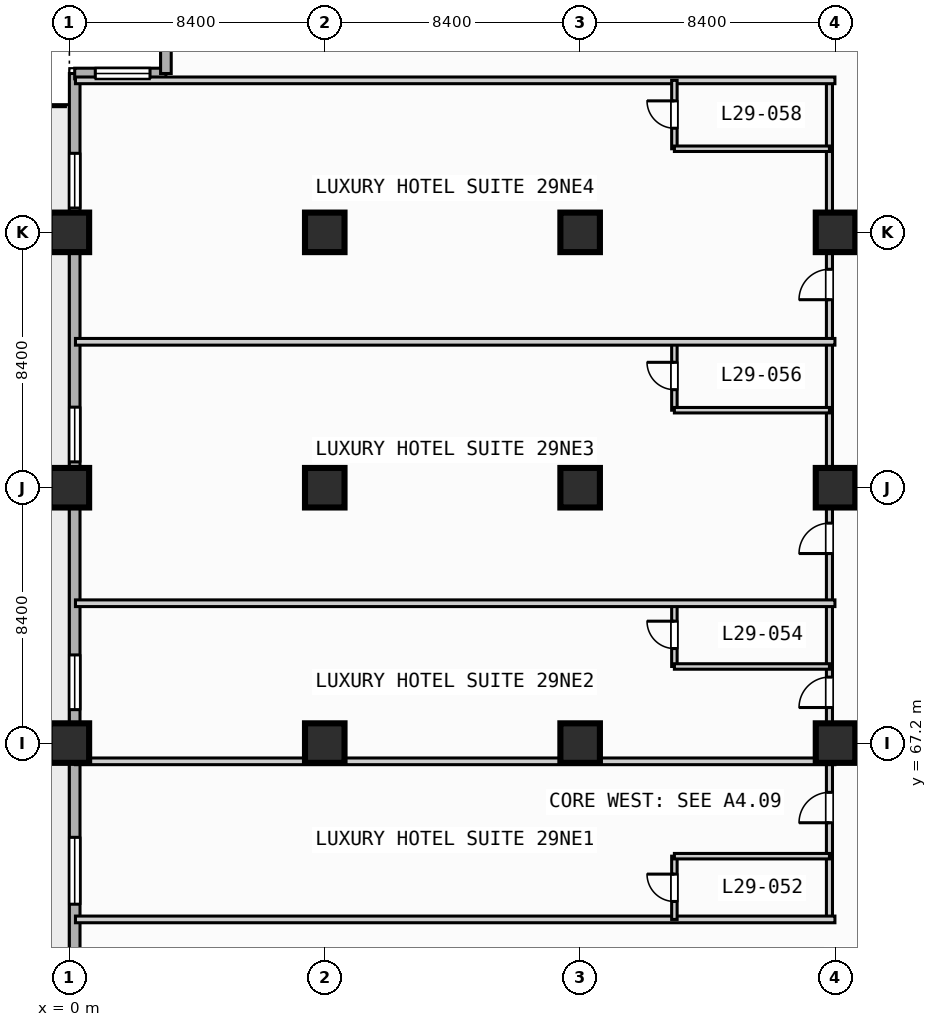
"""IFC4 building model, lengths in metres.
Left out: names, types, materials, properties, quantities, classifications, styles, units other than length and angle.
Written with IfcOpenShell. Run it as: python <this file> out.ifc"""

import sys

from ifc_helpers import new_model, si_unit, direction, frame, frame_2d, origin, origin_2d, place, context, subcontext, project, spatial, rectangle, extrude, element, fill, save


model = new_model("IFC4")
c1 = context("Model", 3, precision=1e-05, world=origin(), true_north=direction((0.0, 1.0)))
c2 = subcontext(c1, "Body", "Model", "MODEL_VIEW")
j1 = project(units=[si_unit("LENGTHUNIT", "METRE"), si_unit("PLANEANGLEUNIT", "RADIAN")], contexts=[c1])
p1 = place(None, origin())
s1 = spatial("IfcSite", under=j1, at=p1, CompositionType="ELEMENT")
p2 = place(p1, origin())
s2 = spatial("IfcBuilding", under=s1, at=p2, CompositionType="ELEMENT")
p3 = place(p2, frame((0.0, 0.0, 122.8)))
s3 = spatial("IfcBuildingStorey", under=s2, at=p3, CompositionType="ELEMENT", Elevation=122.8)
for number, where, z_axis, x_axis in (
    (1, (0.0, 67.2, 0.0), (0.0, 0.0, 1.0), (1.0, 0.0, 0.0)),
    (2, (0.0, 75.6, 0.0), (0.0, 0.0, 1.0), (1.0, 0.0, 0.0)),
    (3, (0.0, 84.0, 0.0), (0.0, 0.0, 1.0), (1.0, 0.0, 0.0)),
    (4, (8.4, 67.2, 0.0), (0.0, 0.0, 1.0), (1.0, 0.0, 0.0)),
    (5, (8.4, 75.6, 0.0), (0.0, 0.0, 1.0), (1.0, 0.0, 0.0)),
    (6, (8.4, 84.0, 0.0), (0.0, 0.0, 1.0), (1.0, 0.0, 0.0)),
    (7, (16.8, 67.2, 0.0), (0.0, 0.0, 1.0), (1.0, 0.0, 0.0)),
    (8, (16.8, 75.6, 0.0), (0.0, 0.0, 1.0), (1.0, 0.0, 0.0)),
    (9, (16.8, 84.0, 0.0), (0.0, 0.0, 1.0), (1.0, 0.0, 0.0)),
    (10, (25.2, 67.2, 0.0), (0.0, 0.0, 1.0), (1.0, 0.0, 0.0)),
    (11, (25.2, 75.6, 0.0), (0.0, 0.0, 1.0), (1.0, 0.0, 0.0)),
    (12, (25.2, 84.0, 0.0), (0.0, 0.0, 1.0), (1.0, 0.0, 0.0)),
):
    element("IfcColumn", number, at=place(p3, frame(where, z_axis=z_axis, x_axis=x_axis)), inside=s3, PredefinedType="COLUMN", context=c2, shape_type="SweptSolid", body=[
        extrude(rectangle(XDim=1.3, YDim=1.3, at=origin_2d()), origin(), (0.0, 0.0, 1.0), 3.8),
    ])
p4 = place(p3, frame((0.175, 3.175, 0.0), z_axis=(0.0, 0.0, 1.0), x_axis=(0.0, 1.0, 0.0)))
e13 = element("IfcWall", 13, at=p4, inside=s3, PredefinedType="STANDARD", context=c2, shape_type="SweptSolid", body=[
    extrude(rectangle(XDim=86.05, YDim=0.35, at=frame_2d((43.025, 0.0))), origin(), (0.0, 0.0, 1.0), 3.55),
])
p5 = place(p4, frame((42.325, 0.0, 0.0)))
e14 = element("IfcOpeningElement", 14, at=p5, cuts=e13, PredefinedType="OPENING", context=c2, shape_type="SweptSolid", body=[
    extrude(rectangle(XDim=1.4, YDim=2.2, at=frame_2d((0.7, 1.1))), frame((0.0, 0.185, 0.0), z_axis=(0.0, -1.0, 0.0), x_axis=(1.0, 0.0, 0.0)), (0.0, 0.0, 1.0), 0.37),
])
p6 = place(p4, frame((33.525, 0.0, 0.85)))
e15 = element("IfcOpeningElement", 15, at=p6, cuts=e13, PredefinedType="OPENING", context=c2, shape_type="SweptSolid", body=[
    extrude(rectangle(XDim=2.2, YDim=1.8, at=frame_2d((1.1, 0.9))), frame((0.0, 0.185, 0.0), z_axis=(0.0, -1.0, 0.0), x_axis=(1.0, 0.0, 0.0)), (0.0, 0.0, 1.0), 0.37),
])
p7 = place(p4, frame((58.725, 0.0, 0.85)))
e16 = element("IfcOpeningElement", 16, at=p7, cuts=e13, PredefinedType="OPENING", context=c2, shape_type="SweptSolid", body=[
    extrude(rectangle(XDim=2.2, YDim=1.8, at=frame_2d((1.1, 0.9))), frame((0.0, 0.185, 0.0), z_axis=(0.0, -1.0, 0.0), x_axis=(1.0, 0.0, 0.0)), (0.0, 0.0, 1.0), 0.37),
])
p8 = place(p4, frame((65.125, 0.0, 0.85)))
e17 = element("IfcOpeningElement", 17, at=p8, cuts=e13, PredefinedType="OPENING", context=c2, shape_type="SweptSolid", body=[
    extrude(rectangle(XDim=1.8, YDim=1.8, at=frame_2d((0.9, 0.9))), frame((0.0, 0.185, 0.0), z_axis=(0.0, -1.0, 0.0), x_axis=(1.0, 0.0, 0.0)), (0.0, 0.0, 1.0), 0.37),
])
p9 = place(p4, frame((73.275, 0.0, 0.85)))
e18 = element("IfcOpeningElement", 18, at=p9, cuts=e13, PredefinedType="OPENING", context=c2, shape_type="SweptSolid", body=[
    extrude(rectangle(XDim=1.8, YDim=1.8, at=frame_2d((0.9, 0.9))), frame((0.0, 0.185, 0.0), z_axis=(0.0, -1.0, 0.0), x_axis=(1.0, 0.0, 0.0)), (0.0, 0.0, 1.0), 0.37),
])
p10 = place(p4, frame((81.625, 0.0, 0.85)))
e19 = element("IfcOpeningElement", 19, at=p10, cuts=e13, PredefinedType="OPENING", context=c2, shape_type="SweptSolid", body=[
    extrude(rectangle(XDim=1.8, YDim=1.8, at=frame_2d((0.9, 0.9))), frame((0.0, 0.185, 0.0), z_axis=(0.0, -1.0, 0.0), x_axis=(1.0, 0.0, 0.0)), (0.0, 0.0, 1.0), 0.37),
])
p11 = place(p3, frame((0.175, 89.225, 0.0), z_axis=(0.0, 0.0, 1.0), x_axis=(1.0, 0.0, 0.0)))
e20 = element("IfcWall", 20, at=p11, inside=s3, PredefinedType="STANDARD", context=c2, shape_type="SweptSolid", body=[
    extrude(rectangle(XDim=3.0, YDim=0.35, at=frame_2d((1.5, 0.0))), origin(), (0.0, 0.0, 1.0), 3.55),
])
p12 = place(p11, frame((0.677, 0.0, 0.85)))
e21 = element("IfcOpeningElement", 21, at=p12, cuts=e20, PredefinedType="OPENING", context=c2, shape_type="SweptSolid", body=[
    extrude(rectangle(XDim=1.8, YDim=1.8, at=frame_2d((0.9, 0.9))), frame((0.0, 0.185, 0.0), z_axis=(0.0, -1.0, 0.0), x_axis=(1.0, 0.0, 0.0)), (0.0, 0.0, 1.0), 0.37),
])
p13 = place(p3, frame((3.175, 89.225, 0.0), z_axis=(0.0, 0.0, 1.0), x_axis=(0.0, 1.0, 0.0)))
e22 = element("IfcWall", 22, at=p13, inside=s3, PredefinedType="STANDARD", context=c2, shape_type="SweptSolid", body=[
    extrude(rectangle(XDim=3.0, YDim=0.35, at=frame_2d((1.5, 0.0))), origin(), (0.0, 0.0, 1.0), 3.55),
])
p14 = place(p3, frame((25.0, 61.4, 0.0), z_axis=(0.0, 0.0, 1.0), x_axis=(0.0, 1.0, 0.0)))
e23 = element("IfcWall", 23, at=p14, inside=s3, PredefinedType="PARTITIONING", context=c2, shape_type="SweptSolid", body=[
    extrude(rectangle(XDim=27.6, YDim=0.2, at=frame_2d((13.8, 0.0))), origin(), (0.0, 0.0, 1.0), 2.8),
])
p15 = place(p14, frame((3.18, 0.0, 0.0)))
e24 = element("IfcOpeningElement", 24, at=p15, cuts=e23, PredefinedType="OPENING", context=c2, shape_type="SweptSolid", body=[
    extrude(rectangle(XDim=1.0, YDim=2.15, at=frame_2d((0.5, 1.075))), frame((0.0, 0.11, 0.0), z_axis=(0.0, -1.0, 0.0), x_axis=(1.0, 0.0, 0.0)), (0.0, 0.0, 1.0), 0.22),
])
p16 = place(p14, frame((6.97, 0.0, 0.0)))
e25 = element("IfcOpeningElement", 25, at=p16, cuts=e23, PredefinedType="OPENING", context=c2, shape_type="SweptSolid", body=[
    extrude(rectangle(XDim=1.0, YDim=2.15, at=frame_2d((0.5, 1.075))), frame((0.0, 0.11, 0.0), z_axis=(0.0, -1.0, 0.0), x_axis=(1.0, 0.0, 0.0)), (0.0, 0.0, 1.0), 0.22),
])
p17 = place(p14, frame((12.035, 0.0, 0.0)))
e26 = element("IfcOpeningElement", 26, at=p17, cuts=e23, PredefinedType="OPENING", context=c2, shape_type="SweptSolid", body=[
    extrude(rectangle(XDim=1.0, YDim=2.15, at=frame_2d((0.5, 1.075))), frame((0.0, 0.11, 0.0), z_axis=(0.0, -1.0, 0.0), x_axis=(1.0, 0.0, 0.0)), (0.0, 0.0, 1.0), 0.22),
])
p18 = place(p14, frame((20.385, 0.0, 0.0)))
e27 = element("IfcOpeningElement", 27, at=p18, cuts=e23, PredefinedType="OPENING", context=c2, shape_type="SweptSolid", body=[
    extrude(rectangle(XDim=1.0, YDim=2.15, at=frame_2d((0.5, 1.075))), frame((0.0, 0.11, 0.0), z_axis=(0.0, -1.0, 0.0), x_axis=(1.0, 0.0, 0.0)), (0.0, 0.0, 1.0), 0.22),
])
p19 = place(p3, frame((0.2, 61.4, 0.0), z_axis=(0.0, 0.0, 1.0), x_axis=(1.0, 0.0, 0.0)))
e28 = element("IfcWall", 28, at=p19, inside=s3, PredefinedType="PARTITIONING", context=c2, shape_type="SweptSolid", body=[
    extrude(rectangle(XDim=24.98, YDim=0.22, at=frame_2d((12.49, 0.0))), origin(), (0.0, 0.0, 1.0), 3.55),
])
p20 = place(p3, frame((19.9, 61.4, 0.0), z_axis=(0.0, 0.0, 1.0), x_axis=(0.0, 1.0, 0.0)))
e29 = element("IfcWall", 29, at=p20, inside=s3, PredefinedType="PLUMBINGWALL", context=c2, shape_type="SweptSolid", body=[
    extrude(rectangle(XDim=2.08, YDim=0.18, at=frame_2d((1.04, 0.0))), origin(), (0.0, 0.0, 1.0), 3.55),
])
p21 = place(p20, frame((0.59, 0.0, 0.0)))
e30 = element("IfcOpeningElement", 30, at=p21, cuts=e29, PredefinedType="OPENING", context=c2, shape_type="SweptSolid", body=[
    extrude(rectangle(XDim=0.9, YDim=2.1, at=frame_2d((0.45, 1.05))), frame((0.0, 0.1, 0.0), z_axis=(0.0, -1.0, 0.0), x_axis=(1.0, 0.0, 0.0)), (0.0, 0.0, 1.0), 0.2),
])
p22 = place(p3, frame((19.9, 63.48, 0.0), z_axis=(0.0, 0.0, 1.0), x_axis=(1.0, 0.0, 0.0)))
e31 = element("IfcWall", 31, at=p22, inside=s3, PredefinedType="PLUMBINGWALL", context=c2, shape_type="SweptSolid", body=[
    extrude(rectangle(XDim=5.1, YDim=0.18, at=frame_2d((2.55, 0.0))), origin(), (0.0, 0.0, 1.0), 3.55),
])
p23 = place(p3, frame((0.2, 66.6, 0.0), z_axis=(0.0, 0.0, 1.0), x_axis=(1.0, 0.0, 0.0)))
e32 = element("IfcWall", 32, at=p23, inside=s3, PredefinedType="PARTITIONING", context=c2, shape_type="SweptSolid", body=[
    extrude(rectangle(XDim=24.98, YDim=0.22, at=frame_2d((12.49, 0.0))), origin(), (0.0, 0.0, 1.0), 3.55),
])
p24 = place(p3, frame((19.9, 69.72, 0.0), z_axis=(0.0, 0.0, 1.0), x_axis=(0.0, 1.0, 0.0)))
e33 = element("IfcWall", 33, at=p24, inside=s3, PredefinedType="PLUMBINGWALL", context=c2, shape_type="SweptSolid", body=[
    extrude(rectangle(XDim=2.08, YDim=0.18, at=frame_2d((1.04, 0.0))), origin(), (0.0, 0.0, 1.0), 3.55),
])
p25 = place(p24, frame((0.59, 0.0, 0.0)))
e34 = element("IfcOpeningElement", 34, at=p25, cuts=e33, PredefinedType="OPENING", context=c2, shape_type="SweptSolid", body=[
    extrude(rectangle(XDim=0.9, YDim=2.1, at=frame_2d((0.45, 1.05))), frame((0.0, 0.1, 0.0), z_axis=(0.0, -1.0, 0.0), x_axis=(1.0, 0.0, 0.0)), (0.0, 0.0, 1.0), 0.2),
])
p26 = place(p3, frame((19.9, 69.72, 0.0), z_axis=(0.0, 0.0, 1.0), x_axis=(1.0, 0.0, 0.0)))
e35 = element("IfcWall", 35, at=p26, inside=s3, PredefinedType="PLUMBINGWALL", context=c2, shape_type="SweptSolid", body=[
    extrude(rectangle(XDim=5.1, YDim=0.18, at=frame_2d((2.55, 0.0))), origin(), (0.0, 0.0, 1.0), 3.55),
])
p27 = place(p3, frame((0.2, 71.8, 0.0), z_axis=(0.0, 0.0, 1.0), x_axis=(1.0, 0.0, 0.0)))
e36 = element("IfcWall", 36, at=p27, inside=s3, PredefinedType="PARTITIONING", context=c2, shape_type="SweptSolid", body=[
    extrude(rectangle(XDim=24.98, YDim=0.22, at=frame_2d((12.49, 0.0))), origin(), (0.0, 0.0, 1.0), 3.55),
])
p28 = place(p3, frame((19.9, 78.15, 0.0), z_axis=(0.0, 0.0, 1.0), x_axis=(0.0, 1.0, 0.0)))
e37 = element("IfcWall", 37, at=p28, inside=s3, PredefinedType="PLUMBINGWALL", context=c2, shape_type="SweptSolid", body=[
    extrude(rectangle(XDim=2.25, YDim=0.18, at=frame_2d((1.125, 0.0))), origin(), (0.0, 0.0, 1.0), 3.55),
])
p29 = place(p28, frame((0.675, 0.0, 0.0)))
e38 = element("IfcOpeningElement", 38, at=p29, cuts=e37, PredefinedType="OPENING", context=c2, shape_type="SweptSolid", body=[
    extrude(rectangle(XDim=0.9, YDim=2.1, at=frame_2d((0.45, 1.05))), frame((0.0, 0.1, 0.0), z_axis=(0.0, -1.0, 0.0), x_axis=(1.0, 0.0, 0.0)), (0.0, 0.0, 1.0), 0.2),
])
p30 = place(p3, frame((19.9, 78.15, 0.0), z_axis=(0.0, 0.0, 1.0), x_axis=(1.0, 0.0, 0.0)))
e39 = element("IfcWall", 39, at=p30, inside=s3, PredefinedType="PLUMBINGWALL", context=c2, shape_type="SweptSolid", body=[
    extrude(rectangle(XDim=5.1, YDim=0.18, at=frame_2d((2.55, 0.0))), origin(), (0.0, 0.0, 1.0), 3.55),
])
for number, where, z_axis, x_axis in (
    (40, (0.2, 80.4, 0.0), (0.0, 0.0, 1.0), (1.0, 0.0, 0.0)),
    (41, (0.2, 89.0, 0.0), (0.0, 0.0, 1.0), (1.0, 0.0, 0.0)),
):
    element("IfcWall", number, at=place(p3, frame(where, z_axis=z_axis, x_axis=x_axis)), inside=s3, PredefinedType="PARTITIONING", context=c2, shape_type="SweptSolid", body=[
        extrude(rectangle(XDim=24.98, YDim=0.22, at=frame_2d((12.49, 0.0))), origin(), (0.0, 0.0, 1.0), 3.55),
    ])
p31 = place(p3, frame((19.9, 86.75, 0.0), z_axis=(0.0, 0.0, 1.0), x_axis=(0.0, 1.0, 0.0)))
e42 = element("IfcWall", 42, at=p31, inside=s3, PredefinedType="PLUMBINGWALL", context=c2, shape_type="SweptSolid", body=[
    extrude(rectangle(XDim=2.25, YDim=0.18, at=frame_2d((1.125, 0.0))), origin(), (0.0, 0.0, 1.0), 3.55),
])
p32 = place(p31, frame((0.675, 0.0, 0.0)))
e43 = element("IfcOpeningElement", 43, at=p32, cuts=e42, PredefinedType="OPENING", context=c2, shape_type="SweptSolid", body=[
    extrude(rectangle(XDim=0.9, YDim=2.1, at=frame_2d((0.45, 1.05))), frame((0.0, 0.1, 0.0), z_axis=(0.0, -1.0, 0.0), x_axis=(1.0, 0.0, 0.0)), (0.0, 0.0, 1.0), 0.2),
])
p33 = place(p3, frame((19.9, 86.75, 0.0), z_axis=(0.0, 0.0, 1.0), x_axis=(1.0, 0.0, 0.0)))
e44 = element("IfcWall", 44, at=p33, inside=s3, PredefinedType="PLUMBINGWALL", context=c2, shape_type="SweptSolid", body=[
    extrude(rectangle(XDim=5.1, YDim=0.18, at=frame_2d((2.55, 0.0))), origin(), (0.0, 0.0, 1.0), 3.55),
])
p34 = place(p7, origin())
e45 = element("IfcWindow", 45, at=p34, inside=s3, PartitioningType="SINGLE_PANEL", PredefinedType="WINDOW", context=c2, shape_type="SweptSolid", body=[
    extrude(rectangle(XDim=2.2, YDim=1.8, at=frame_2d((1.1, 0.9))), frame((0.0, 0.03, 0.0), z_axis=(0.0, -1.0, 0.0), x_axis=(1.0, 0.0, 0.0)), (0.0, 0.0, 1.0), 0.06),
])
fill(e16, e45)
p35 = place(p8, origin())
e46 = element("IfcWindow", 46, at=p35, inside=s3, PartitioningType="SINGLE_PANEL", PredefinedType="WINDOW", context=c2, shape_type="SweptSolid", body=[
    extrude(rectangle(XDim=1.8, YDim=1.8, at=frame_2d((0.9, 0.9))), frame((0.0, 0.03, 0.0), z_axis=(0.0, -1.0, 0.0), x_axis=(1.0, 0.0, 0.0)), (0.0, 0.0, 1.0), 0.06),
])
fill(e17, e46)
p36 = place(p9, origin())
e47 = element("IfcWindow", 47, at=p36, inside=s3, PartitioningType="SINGLE_PANEL", PredefinedType="WINDOW", context=c2, shape_type="SweptSolid", body=[
    extrude(rectangle(XDim=1.8, YDim=1.8, at=frame_2d((0.9, 0.9))), frame((0.0, 0.03, 0.0), z_axis=(0.0, -1.0, 0.0), x_axis=(1.0, 0.0, 0.0)), (0.0, 0.0, 1.0), 0.06),
])
fill(e18, e47)
p37 = place(p10, origin())
e48 = element("IfcWindow", 48, at=p37, inside=s3, PartitioningType="SINGLE_PANEL", PredefinedType="WINDOW", context=c2, shape_type="SweptSolid", body=[
    extrude(rectangle(XDim=1.8, YDim=1.8, at=frame_2d((0.9, 0.9))), frame((0.0, 0.03, 0.0), z_axis=(0.0, -1.0, 0.0), x_axis=(1.0, 0.0, 0.0)), (0.0, 0.0, 1.0), 0.06),
])
fill(e19, e48)
p38 = place(p12, origin())
e49 = element("IfcWindow", 49, at=p38, inside=s3, PartitioningType="SINGLE_PANEL", PredefinedType="WINDOW", context=c2, shape_type="SweptSolid", body=[
    extrude(rectangle(XDim=1.8, YDim=1.8, at=frame_2d((0.9, 0.9))), frame((0.0, 0.03, 0.0), z_axis=(0.0, -1.0, 0.0), x_axis=(1.0, 0.0, 0.0)), (0.0, 0.0, 1.0), 0.06),
])
fill(e21, e49)
p39 = place(p15, origin())
e50 = element("IfcDoor", 50, at=p39, inside=s3, OperationType="SINGLE_SWING_LEFT", PredefinedType="DOOR", context=c2, shape_type="SweptSolid", body=[
    extrude(rectangle(XDim=1.0, YDim=2.15, at=frame_2d((0.5, 1.075))), frame((0.0, 0.025, 0.0), z_axis=(0.0, -1.0, 0.0), x_axis=(1.0, 0.0, 0.0)), (0.0, 0.0, 1.0), 0.05),
])
fill(e24, e50)
p40 = place(p16, origin())
e51 = element("IfcDoor", 51, at=p40, inside=s3, OperationType="SINGLE_SWING_LEFT", PredefinedType="DOOR", context=c2, shape_type="SweptSolid", body=[
    extrude(rectangle(XDim=1.0, YDim=2.15, at=frame_2d((0.5, 1.075))), frame((0.0, 0.025, 0.0), z_axis=(0.0, -1.0, 0.0), x_axis=(1.0, 0.0, 0.0)), (0.0, 0.0, 1.0), 0.05),
])
fill(e25, e51)
p41 = place(p17, origin())
e52 = element("IfcDoor", 52, at=p41, inside=s3, OperationType="SINGLE_SWING_LEFT", PredefinedType="DOOR", context=c2, shape_type="SweptSolid", body=[
    extrude(rectangle(XDim=1.0, YDim=2.15, at=frame_2d((0.5, 1.075))), frame((0.0, 0.025, 0.0), z_axis=(0.0, -1.0, 0.0), x_axis=(1.0, 0.0, 0.0)), (0.0, 0.0, 1.0), 0.05),
])
fill(e26, e52)
p42 = place(p18, origin())
e53 = element("IfcDoor", 53, at=p42, inside=s3, OperationType="SINGLE_SWING_LEFT", PredefinedType="DOOR", context=c2, shape_type="SweptSolid", body=[
    extrude(rectangle(XDim=1.0, YDim=2.15, at=frame_2d((0.5, 1.075))), frame((0.0, 0.025, 0.0), z_axis=(0.0, -1.0, 0.0), x_axis=(1.0, 0.0, 0.0)), (0.0, 0.0, 1.0), 0.05),
])
fill(e27, e53)
p43 = place(p21, origin())
e54 = element("IfcDoor", 54, at=p43, inside=s3, OperationType="SINGLE_SWING_RIGHT", PredefinedType="DOOR", context=c2, shape_type="SweptSolid", body=[
    extrude(rectangle(XDim=0.9, YDim=2.1, at=frame_2d((0.45, 1.05))), frame((0.0, 0.025, 0.0), z_axis=(0.0, -1.0, 0.0), x_axis=(1.0, 0.0, 0.0)), (0.0, 0.0, 1.0), 0.05),
])
fill(e30, e54)
p44 = place(p25, origin())
e55 = element("IfcDoor", 55, at=p44, inside=s3, OperationType="SINGLE_SWING_RIGHT", PredefinedType="DOOR", context=c2, shape_type="SweptSolid", body=[
    extrude(rectangle(XDim=0.9, YDim=2.1, at=frame_2d((0.45, 1.05))), frame((0.0, 0.025, 0.0), z_axis=(0.0, -1.0, 0.0), x_axis=(1.0, 0.0, 0.0)), (0.0, 0.0, 1.0), 0.05),
])
fill(e34, e55)
p45 = place(p29, origin())
e56 = element("IfcDoor", 56, at=p45, inside=s3, OperationType="SINGLE_SWING_RIGHT", PredefinedType="DOOR", context=c2, shape_type="SweptSolid", body=[
    extrude(rectangle(XDim=0.9, YDim=2.1, at=frame_2d((0.45, 1.05))), frame((0.0, 0.025, 0.0), z_axis=(0.0, -1.0, 0.0), x_axis=(1.0, 0.0, 0.0)), (0.0, 0.0, 1.0), 0.05),
])
fill(e38, e56)
p46 = place(p32, origin())
e57 = element("IfcDoor", 57, at=p46, inside=s3, OperationType="SINGLE_SWING_RIGHT", PredefinedType="DOOR", context=c2, shape_type="SweptSolid", body=[
    extrude(rectangle(XDim=0.9, YDim=2.1, at=frame_2d((0.45, 1.05))), frame((0.0, 0.025, 0.0), z_axis=(0.0, -1.0, 0.0), x_axis=(1.0, 0.0, 0.0)), (0.0, 0.0, 1.0), 0.05),
])
fill(e43, e57)
save(model, sys.argv[1])
